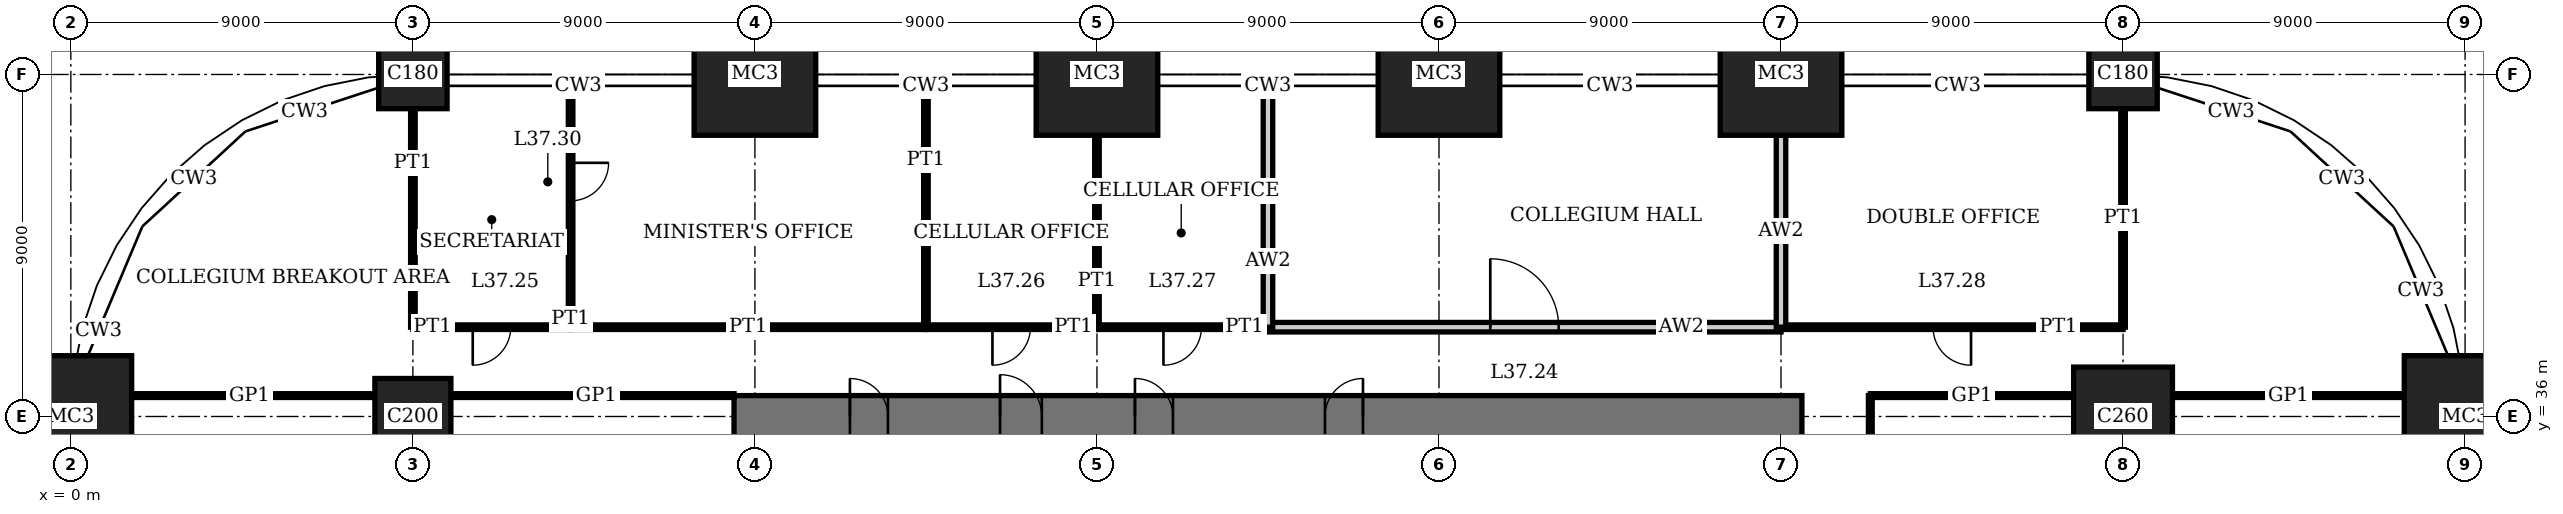
"""IFC4 building model, lengths in metres.
Left out: names, types, materials, properties, quantities, classifications, styles, units other than length and angle.
Written with IfcOpenShell. Run it as: python <this file> out.ifc"""

import sys

from ifc_helpers import new_model, si_unit, direction, frame, frame_2d, origin, origin_2d, place, context, subcontext, project, spatial, rectangle, extrude, element, fill, save


model = new_model("IFC4")
c1 = context("Model", 3, precision=1e-05, world=origin(), true_north=direction((0.0, 1.0)))
c2 = subcontext(c1, "Body", "Model", "MODEL_VIEW")
j1 = project(units=[si_unit("LENGTHUNIT", "METRE"), si_unit("PLANEANGLEUNIT", "RADIAN")], contexts=[c1])
p1 = place(None, origin())
s1 = spatial("IfcSite", under=j1, at=p1, CompositionType="ELEMENT")
p2 = place(p1, origin())
s2 = spatial("IfcBuilding", under=s1, at=p2, CompositionType="ELEMENT")
p3 = place(p2, frame((0.0, 0.0, 153.0)))
s3 = spatial("IfcBuildingStorey", under=s2, at=p3, CompositionType="ELEMENT", Elevation=153.0)
p4 = place(p3, frame((0.0, 36.0, 0.0), z_axis=(0.0, 0.0, 1.0), x_axis=(1.0, 0.0, 0.0)))
e1 = element("IfcColumn", 1, at=p4, inside=s3, PredefinedType="COLUMN", context=c2, shape_type="SweptSolid", body=[
    extrude(rectangle(XDim=3.2, YDim=3.2, at=origin_2d()), origin(), (0.0, 0.0, 1.0), 4.2),
])
p5 = place(p3, frame((9.0, 36.0, 0.0), z_axis=(0.0, 0.0, 1.0), x_axis=(1.0, 0.0, 0.0)))
e2 = element("IfcColumn", 2, at=p5, inside=s3, PredefinedType="COLUMN", context=c2, shape_type="SweptSolid", body=[
    extrude(rectangle(XDim=2.0, YDim=2.0, at=origin_2d()), origin(), (0.0, 0.0, 1.0), 4.2),
])
p6 = place(p3, frame((9.0, 45.0, 0.0), z_axis=(0.0, 0.0, 1.0), x_axis=(1.0, 0.0, 0.0)))
e3 = element("IfcColumn", 3, at=p6, inside=s3, PredefinedType="COLUMN", context=c2, shape_type="SweptSolid", body=[
    extrude(rectangle(XDim=1.8, YDim=1.8, at=origin_2d()), origin(), (0.0, 0.0, 1.0), 4.2),
])
for number, where, z_axis, x_axis in (
    (4, (18.0, 45.0, 0.0), (0.0, 0.0, 1.0), (1.0, 0.0, 0.0)),
    (5, (27.0, 45.0, 0.0), (0.0, 0.0, 1.0), (1.0, 0.0, 0.0)),
    (6, (36.0, 45.0, 0.0), (0.0, 0.0, 1.0), (1.0, 0.0, 0.0)),
    (7, (45.0, 45.0, 0.0), (0.0, 0.0, 1.0), (1.0, 0.0, 0.0)),
):
    element("IfcColumn", number, at=place(p3, frame(where, z_axis=z_axis, x_axis=x_axis)), inside=s3, PredefinedType="COLUMN", context=c2, shape_type="SweptSolid", body=[
        extrude(rectangle(XDim=3.2, YDim=3.2, at=origin_2d()), origin(), (0.0, 0.0, 1.0), 4.2),
    ])
p7 = place(p3, frame((54.0, 36.0, 0.0), z_axis=(0.0, 0.0, 1.0), x_axis=(1.0, 0.0, 0.0)))
e8 = element("IfcColumn", 8, at=p7, inside=s3, PredefinedType="COLUMN", context=c2, shape_type="SweptSolid", body=[
    extrude(rectangle(XDim=2.6, YDim=2.6, at=origin_2d()), origin(), (0.0, 0.0, 1.0), 4.2),
])
p8 = place(p3, frame((54.0, 45.0, 0.0), z_axis=(0.0, 0.0, 1.0), x_axis=(1.0, 0.0, 0.0)))
e9 = element("IfcColumn", 9, at=p8, inside=s3, PredefinedType="COLUMN", context=c2, shape_type="SweptSolid", body=[
    extrude(rectangle(XDim=1.8, YDim=1.8, at=origin_2d()), origin(), (0.0, 0.0, 1.0), 4.2),
])
p9 = place(p3, frame((63.0, 36.0, 0.0), z_axis=(0.0, 0.0, 1.0), x_axis=(1.0, 0.0, 0.0)))
e10 = element("IfcColumn", 10, at=p9, inside=s3, PredefinedType="COLUMN", context=c2, shape_type="SweptSolid", body=[
    extrude(rectangle(XDim=3.2, YDim=3.2, at=origin_2d()), origin(), (0.0, 0.0, 1.0), 4.2),
])
p10 = place(p3, frame((45.55, 36.0, 0.0), z_axis=(0.0, 0.0, 1.0), x_axis=(-1.0, 0.0, 0.0)))
e11 = element("IfcWall", 11, at=p10, inside=s3, PredefinedType="SHEAR", context=c2, shape_type="SweptSolid", body=[
    extrude(rectangle(XDim=28.1, YDim=1.1, at=frame_2d((14.05, 0.0))), origin(), (0.0, 0.0, 1.0), 4.2),
])
p11 = place(p10, frame((11.55, 0.0, 0.0)))
e12 = element("IfcOpeningElement", 12, at=p11, cuts=e11, PredefinedType="OPENING", context=c2, shape_type="SweptSolid", body=[
    extrude(rectangle(XDim=1.0, YDim=2.4, at=frame_2d((0.5, 1.2))), frame((0.0, 0.56, 0.0), z_axis=(0.0, -1.0, 0.0), x_axis=(1.0, 0.0, 0.0)), (0.0, 0.0, 1.0), 1.12),
])
p12 = place(p10, frame((16.55, 0.0, 0.0)))
e13 = element("IfcOpeningElement", 13, at=p12, cuts=e11, PredefinedType="OPENING", context=c2, shape_type="SweptSolid", body=[
    extrude(rectangle(XDim=1.0, YDim=2.4, at=frame_2d((0.5, 1.2))), frame((0.0, 0.56, 0.0), z_axis=(0.0, -1.0, 0.0), x_axis=(1.0, 0.0, 0.0)), (0.0, 0.0, 1.0), 1.12),
])
p13 = place(p10, frame((20.0, 0.0, 0.0)))
e14 = element("IfcOpeningElement", 14, at=p13, cuts=e11, PredefinedType="OPENING", context=c2, shape_type="SweptSolid", body=[
    extrude(rectangle(XDim=1.1, YDim=2.4, at=frame_2d((0.55, 1.2))), frame((0.0, 0.56, 0.0), z_axis=(0.0, -1.0, 0.0), x_axis=(1.0, 0.0, 0.0)), (0.0, 0.0, 1.0), 1.12),
])
p14 = place(p10, frame((24.05, 0.0, 0.0)))
e15 = element("IfcOpeningElement", 15, at=p14, cuts=e11, PredefinedType="OPENING", context=c2, shape_type="SweptSolid", body=[
    extrude(rectangle(XDim=1.0, YDim=2.4, at=frame_2d((0.5, 1.2))), frame((0.0, 0.56, 0.0), z_axis=(0.0, -1.0, 0.0), x_axis=(1.0, 0.0, 0.0)), (0.0, 0.0, 1.0), 1.12),
])
p15 = place(p3, frame((1.6, 36.55, 0.0), z_axis=(0.0, 0.0, 1.0), x_axis=(1.0, 0.0, 0.0)))
e16 = element("IfcWall", 16, at=p15, inside=s3, PredefinedType="PARTITIONING", context=c2, shape_type="SweptSolid", body=[
    extrude(rectangle(XDim=6.4, YDim=0.1, at=frame_2d((3.2, 0.0))), origin(), (0.0, 0.0, 1.0), 3.85),
])
p16 = place(p3, frame((10.0, 36.55, 0.0), z_axis=(0.0, 0.0, 1.0), x_axis=(1.0, 0.0, 0.0)))
e17 = element("IfcWall", 17, at=p16, inside=s3, PredefinedType="PARTITIONING", context=c2, shape_type="SweptSolid", body=[
    extrude(rectangle(XDim=7.45, YDim=0.1, at=frame_2d((3.725, 0.0))), origin(), (0.0, 0.0, 1.0), 3.85),
])
p17 = place(p3, frame((47.35, 36.55, 0.0), z_axis=(0.0, 0.0, 1.0), x_axis=(1.0, 0.0, 0.0)))
e18 = element("IfcWall", 18, at=p17, inside=s3, PredefinedType="PARTITIONING", context=c2, shape_type="SweptSolid", body=[
    extrude(rectangle(XDim=5.35, YDim=0.1, at=frame_2d((2.675, 0.0))), origin(), (0.0, 0.0, 1.0), 3.85),
])
p18 = place(p3, frame((55.3, 36.55, 0.0), z_axis=(0.0, 0.0, 1.0), x_axis=(1.0, 0.0, 0.0)))
e19 = element("IfcWall", 19, at=p18, inside=s3, PredefinedType="PARTITIONING", context=c2, shape_type="SweptSolid", body=[
    extrude(rectangle(XDim=6.1, YDim=0.1, at=frame_2d((3.05, 0.0))), origin(), (0.0, 0.0, 1.0), 3.85),
])
p19 = place(p3, frame((31.5, 38.35, 0.0), z_axis=(0.0, 0.0, 1.0), x_axis=(1.0, 0.0, 0.0)))
e20 = element("IfcWall", 20, at=p19, inside=s3, PredefinedType="PARTITIONING", context=c2, shape_type="SweptSolid", body=[
    extrude(rectangle(XDim=13.5, YDim=0.25, at=frame_2d((6.75, 0.0))), origin(), (0.0, 0.0, 1.0), 3.85),
])
p20 = place(p19, frame((5.85, 0.0, 0.0)))
e21 = element("IfcOpeningElement", 21, at=p20, cuts=e20, PredefinedType="OPENING", context=c2, shape_type="SweptSolid", body=[
    extrude(rectangle(XDim=1.8, YDim=2.4, at=frame_2d((0.9, 1.2))), frame((0.0, 0.135, 0.0), z_axis=(0.0, -1.0, 0.0), x_axis=(1.0, 0.0, 0.0)), (0.0, 0.0, 1.0), 0.27),
])
p21 = place(p3, frame((9.0, 38.35, 0.0), z_axis=(0.0, 0.0, 1.0), x_axis=(1.0, 0.0, 0.0)))
e22 = element("IfcWall", 22, at=p21, inside=s3, PredefinedType="PARTITIONING", context=c2, shape_type="SweptSolid", body=[
    extrude(rectangle(XDim=4.15, YDim=0.12, at=frame_2d((2.075, 0.0))), origin(), (0.0, 0.0, 1.0), 3.85),
])
p22 = place(p21, frame((1.575, 0.0, 0.0)))
e23 = element("IfcOpeningElement", 23, at=p22, cuts=e22, PredefinedType="OPENING", context=c2, shape_type="SweptSolid", body=[
    extrude(rectangle(XDim=1.0, YDim=2.4, at=frame_2d((0.5, 1.2))), frame((0.0, 0.07, 0.0), z_axis=(0.0, -1.0, 0.0), x_axis=(1.0, 0.0, 0.0)), (0.0, 0.0, 1.0), 0.14),
])
p23 = place(p3, frame((13.15, 38.35, 0.0), z_axis=(0.0, 0.0, 1.0), x_axis=(1.0, 0.0, 0.0)))
e24 = element("IfcWall", 24, at=p23, inside=s3, PredefinedType="PARTITIONING", context=c2, shape_type="SweptSolid", body=[
    extrude(rectangle(XDim=9.35, YDim=0.12, at=frame_2d((4.675, 0.0))), origin(), (0.0, 0.0, 1.0), 3.85),
])
p24 = place(p3, frame((22.5, 38.35, 0.0), z_axis=(0.0, 0.0, 1.0), x_axis=(1.0, 0.0, 0.0)))
e25 = element("IfcWall", 25, at=p24, inside=s3, PredefinedType="PARTITIONING", context=c2, shape_type="SweptSolid", body=[
    extrude(rectangle(XDim=4.5, YDim=0.12, at=frame_2d((2.25, 0.0))), origin(), (0.0, 0.0, 1.0), 3.85),
])
p25 = place(p24, frame((1.75, 0.0, 0.0)))
e26 = element("IfcOpeningElement", 26, at=p25, cuts=e25, PredefinedType="OPENING", context=c2, shape_type="SweptSolid", body=[
    extrude(rectangle(XDim=1.0, YDim=2.4, at=frame_2d((0.5, 1.2))), frame((0.0, 0.07, 0.0), z_axis=(0.0, -1.0, 0.0), x_axis=(1.0, 0.0, 0.0)), (0.0, 0.0, 1.0), 0.14),
])
p26 = place(p3, frame((27.0, 38.35, 0.0), z_axis=(0.0, 0.0, 1.0), x_axis=(1.0, 0.0, 0.0)))
e27 = element("IfcWall", 27, at=p26, inside=s3, PredefinedType="PARTITIONING", context=c2, shape_type="SweptSolid", body=[
    extrude(rectangle(XDim=4.5, YDim=0.12, at=frame_2d((2.25, 0.0))), origin(), (0.0, 0.0, 1.0), 3.85),
])
p27 = place(p26, frame((1.75, 0.0, 0.0)))
e28 = element("IfcOpeningElement", 28, at=p27, cuts=e27, PredefinedType="OPENING", context=c2, shape_type="SweptSolid", body=[
    extrude(rectangle(XDim=1.0, YDim=2.4, at=frame_2d((0.5, 1.2))), frame((0.0, 0.07, 0.0), z_axis=(0.0, -1.0, 0.0), x_axis=(1.0, 0.0, 0.0)), (0.0, 0.0, 1.0), 0.14),
])
p28 = place(p3, frame((45.0, 38.35, 0.0), z_axis=(0.0, 0.0, 1.0), x_axis=(1.0, 0.0, 0.0)))
e29 = element("IfcWall", 29, at=p28, inside=s3, PredefinedType="PARTITIONING", context=c2, shape_type="SweptSolid", body=[
    extrude(rectangle(XDim=9.0, YDim=0.12, at=frame_2d((4.5, 0.0))), origin(), (0.0, 0.0, 1.0), 3.85),
])
p29 = place(p28, frame((4.0, 0.0, 0.0)))
e30 = element("IfcOpeningElement", 30, at=p29, cuts=e29, PredefinedType="OPENING", context=c2, shape_type="SweptSolid", body=[
    extrude(rectangle(XDim=1.0, YDim=2.4, at=frame_2d((0.5, 1.2))), frame((0.0, 0.07, 0.0), z_axis=(0.0, -1.0, 0.0), x_axis=(1.0, 0.0, 0.0)), (0.0, 0.0, 1.0), 0.14),
])
p30 = place(p3, frame((9.0, 38.35, 0.0), z_axis=(0.0, 0.0, 1.0), x_axis=(0.0, 1.0, 0.0)))
e31 = element("IfcWall", 31, at=p30, inside=s3, PredefinedType="PARTITIONING", context=c2, shape_type="SweptSolid", body=[
    extrude(rectangle(XDim=5.75, YDim=0.12, at=frame_2d((2.875, 0.0))), origin(), (0.0, 0.0, 1.0), 3.05),
])
p31 = place(p3, frame((13.15, 38.35, 0.0), z_axis=(0.0, 0.0, 1.0), x_axis=(0.0, 1.0, 0.0)))
e32 = element("IfcWall", 32, at=p31, inside=s3, PredefinedType="PARTITIONING", context=c2, shape_type="SweptSolid", body=[
    extrude(rectangle(XDim=6.34, YDim=0.12, at=frame_2d((3.17, 0.0))), origin(), (0.0, 0.0, 1.0), 3.85),
])
p32 = place(p31, frame((3.325, 0.0, 0.0)))
e33 = element("IfcOpeningElement", 33, at=p32, cuts=e32, PredefinedType="OPENING", context=c2, shape_type="SweptSolid", body=[
    extrude(rectangle(XDim=1.0, YDim=2.4, at=frame_2d((0.5, 1.2))), frame((0.0, 0.07, 0.0), z_axis=(0.0, -1.0, 0.0), x_axis=(1.0, 0.0, 0.0)), (0.0, 0.0, 1.0), 0.14),
])
p33 = place(p3, frame((22.5, 38.35, 0.0), z_axis=(0.0, 0.0, 1.0), x_axis=(0.0, 1.0, 0.0)))
e34 = element("IfcWall", 34, at=p33, inside=s3, PredefinedType="PARTITIONING", context=c2, shape_type="SweptSolid", body=[
    extrude(rectangle(XDim=6.34, YDim=0.12, at=frame_2d((3.17, 0.0))), origin(), (0.0, 0.0, 1.0), 3.85),
])
p34 = place(p3, frame((27.0, 38.35, 0.0), z_axis=(0.0, 0.0, 1.0), x_axis=(0.0, 1.0, 0.0)))
e35 = element("IfcWall", 35, at=p34, inside=s3, PredefinedType="PARTITIONING", context=c2, shape_type="SweptSolid", body=[
    extrude(rectangle(XDim=5.05, YDim=0.12, at=frame_2d((2.525, 0.0))), origin(), (0.0, 0.0, 1.0), 3.25),
])
p35 = place(p3, frame((31.5, 38.35, 0.0), z_axis=(0.0, 0.0, 1.0), x_axis=(0.0, 1.0, 0.0)))
e36 = element("IfcWall", 36, at=p35, inside=s3, PredefinedType="PARTITIONING", context=c2, shape_type="SweptSolid", body=[
    extrude(rectangle(XDim=6.34, YDim=0.25, at=frame_2d((3.17, 0.0))), origin(), (0.0, 0.0, 1.0), 3.85),
])
p36 = place(p3, frame((45.0, 38.35, 0.0), z_axis=(0.0, 0.0, 1.0), x_axis=(0.0, 1.0, 0.0)))
e37 = element("IfcWall", 37, at=p36, inside=s3, PredefinedType="PARTITIONING", context=c2, shape_type="SweptSolid", body=[
    extrude(rectangle(XDim=5.05, YDim=0.25, at=frame_2d((2.525, 0.0))), origin(), (0.0, 0.0, 1.0), 3.25),
])
p37 = place(p3, frame((47.35, 31.5, 0.0), z_axis=(0.0, 0.0, 1.0), x_axis=(0.0, 1.0, 0.0)))
e38 = element("IfcWall", 38, at=p37, inside=s3, PredefinedType="PARTITIONING", context=c2, shape_type="SweptSolid", body=[
    extrude(rectangle(XDim=5.05, YDim=0.1, at=frame_2d((2.525, 0.0))), origin(), (0.0, 0.0, 1.0), 3.85),
])
p38 = place(p3, frame((54.0, 38.35, 0.0), z_axis=(0.0, 0.0, 1.0), x_axis=(0.0, 1.0, 0.0)))
e39 = element("IfcWall", 39, at=p38, inside=s3, PredefinedType="PARTITIONING", context=c2, shape_type="SweptSolid", body=[
    extrude(rectangle(XDim=5.75, YDim=0.12, at=frame_2d((2.875, 0.0))), origin(), (0.0, 0.0, 1.0), 3.05),
])
p39 = place(p11, origin())
e40 = element("IfcDoor", 40, at=p39, inside=s3, OperationType="SINGLE_SWING_LEFT", PredefinedType="DOOR", context=c2, shape_type="SweptSolid", body=[
    extrude(rectangle(XDim=1.0, YDim=2.4, at=frame_2d((0.5, 1.2))), frame((0.0, 0.025, 0.0), z_axis=(0.0, -1.0, 0.0), x_axis=(1.0, 0.0, 0.0)), (0.0, 0.0, 1.0), 0.05),
    extrude(rectangle(XDim=0.04, YDim=2.4, at=frame_2d((0.02, 1.2))), frame((0.0, 0.4, 0.0), z_axis=(0.0, -1.0, 0.0), x_axis=(1.0, 0.0, 0.0)), (0.0, 0.0, 1.0), 0.8),
    extrude(rectangle(XDim=0.04, YDim=2.4, at=frame_2d((0.98, 1.2))), frame((0.0, 0.4, 0.0), z_axis=(0.0, -1.0, 0.0), x_axis=(1.0, 0.0, 0.0)), (0.0, 0.0, 1.0), 0.8),
    extrude(rectangle(XDim=1.0, YDim=0.04, at=frame_2d((0.5, 2.38))), frame((0.0, 0.4, 0.0), z_axis=(0.0, -1.0, 0.0), x_axis=(1.0, 0.0, 0.0)), (0.0, 0.0, 1.0), 0.8),
])
fill(e12, e40)
p40 = place(p12, origin())
e41 = element("IfcDoor", 41, at=p40, inside=s3, OperationType="SINGLE_SWING_RIGHT", PredefinedType="DOOR", context=c2, shape_type="SweptSolid", body=[
    extrude(rectangle(XDim=1.0, YDim=2.4, at=frame_2d((0.5, 1.2))), frame((0.0, 0.025, 0.0), z_axis=(0.0, -1.0, 0.0), x_axis=(1.0, 0.0, 0.0)), (0.0, 0.0, 1.0), 0.05),
    extrude(rectangle(XDim=0.04, YDim=2.4, at=frame_2d((0.02, 1.2))), frame((0.0, 0.4, 0.0), z_axis=(0.0, -1.0, 0.0), x_axis=(1.0, 0.0, 0.0)), (0.0, 0.0, 1.0), 0.8),
    extrude(rectangle(XDim=0.04, YDim=2.4, at=frame_2d((0.98, 1.2))), frame((0.0, 0.4, 0.0), z_axis=(0.0, -1.0, 0.0), x_axis=(1.0, 0.0, 0.0)), (0.0, 0.0, 1.0), 0.8),
    extrude(rectangle(XDim=1.0, YDim=0.04, at=frame_2d((0.5, 2.38))), frame((0.0, 0.4, 0.0), z_axis=(0.0, -1.0, 0.0), x_axis=(1.0, 0.0, 0.0)), (0.0, 0.0, 1.0), 0.8),
])
fill(e13, e41)
p41 = place(p13, origin())
e42 = element("IfcDoor", 42, at=p41, inside=s3, OperationType="SINGLE_SWING_RIGHT", PredefinedType="DOOR", context=c2, shape_type="SweptSolid", body=[
    extrude(rectangle(XDim=1.1, YDim=2.4, at=frame_2d((0.55, 1.2))), frame((0.0, 0.025, 0.0), z_axis=(0.0, -1.0, 0.0), x_axis=(1.0, 0.0, 0.0)), (0.0, 0.0, 1.0), 0.05),
    extrude(rectangle(XDim=0.04, YDim=2.4, at=frame_2d((0.02, 1.2))), frame((0.0, 0.44, 0.0), z_axis=(0.0, -1.0, 0.0), x_axis=(1.0, 0.0, 0.0)), (0.0, 0.0, 1.0), 0.88),
    extrude(rectangle(XDim=0.04, YDim=2.4, at=frame_2d((1.08, 1.2))), frame((0.0, 0.44, 0.0), z_axis=(0.0, -1.0, 0.0), x_axis=(1.0, 0.0, 0.0)), (0.0, 0.0, 1.0), 0.88),
    extrude(rectangle(XDim=1.1, YDim=0.04, at=frame_2d((0.55, 2.38))), frame((0.0, 0.44, 0.0), z_axis=(0.0, -1.0, 0.0), x_axis=(1.0, 0.0, 0.0)), (0.0, 0.0, 1.0), 0.88),
])
fill(e14, e42)
p42 = place(p14, origin())
e43 = element("IfcDoor", 43, at=p42, inside=s3, OperationType="SINGLE_SWING_RIGHT", PredefinedType="DOOR", context=c2, shape_type="SweptSolid", body=[
    extrude(rectangle(XDim=1.0, YDim=2.4, at=frame_2d((0.5, 1.2))), frame((0.0, 0.025, 0.0), z_axis=(0.0, -1.0, 0.0), x_axis=(1.0, 0.0, 0.0)), (0.0, 0.0, 1.0), 0.05),
    extrude(rectangle(XDim=0.04, YDim=2.4, at=frame_2d((0.02, 1.2))), frame((0.0, 0.4, 0.0), z_axis=(0.0, -1.0, 0.0), x_axis=(1.0, 0.0, 0.0)), (0.0, 0.0, 1.0), 0.8),
    extrude(rectangle(XDim=0.04, YDim=2.4, at=frame_2d((0.98, 1.2))), frame((0.0, 0.4, 0.0), z_axis=(0.0, -1.0, 0.0), x_axis=(1.0, 0.0, 0.0)), (0.0, 0.0, 1.0), 0.8),
    extrude(rectangle(XDim=1.0, YDim=0.04, at=frame_2d((0.5, 2.38))), frame((0.0, 0.4, 0.0), z_axis=(0.0, -1.0, 0.0), x_axis=(1.0, 0.0, 0.0)), (0.0, 0.0, 1.0), 0.8),
])
fill(e15, e43)
p43 = place(p20, origin())
e44 = element("IfcDoor", 44, at=p43, inside=s3, OperationType="DOUBLE_DOOR_SINGLE_SWING", PredefinedType="DOOR", context=c2, shape_type="SweptSolid", body=[
    extrude(rectangle(XDim=1.8, YDim=2.4, at=frame_2d((0.9, 1.2))), frame((0.0, 0.025, 0.0), z_axis=(0.0, -1.0, 0.0), x_axis=(1.0, 0.0, 0.0)), (0.0, 0.0, 1.0), 0.05),
])
fill(e21, e44)
p44 = place(p22, origin())
e45 = element("IfcDoor", 45, at=p44, inside=s3, OperationType="SINGLE_SWING_LEFT", PredefinedType="DOOR", context=c2, shape_type="SweptSolid", body=[
    extrude(rectangle(XDim=1.0, YDim=2.4, at=frame_2d((0.5, 1.2))), frame((0.0, 0.025, 0.0), z_axis=(0.0, -1.0, 0.0), x_axis=(1.0, 0.0, 0.0)), (0.0, 0.0, 1.0), 0.05),
])
fill(e23, e45)
p45 = place(p25, origin())
e46 = element("IfcDoor", 46, at=p45, inside=s3, OperationType="SINGLE_SWING_LEFT", PredefinedType="DOOR", context=c2, shape_type="SweptSolid", body=[
    extrude(rectangle(XDim=1.0, YDim=2.4, at=frame_2d((0.5, 1.2))), frame((0.0, 0.025, 0.0), z_axis=(0.0, -1.0, 0.0), x_axis=(1.0, 0.0, 0.0)), (0.0, 0.0, 1.0), 0.05),
])
fill(e26, e46)
p46 = place(p27, origin())
e47 = element("IfcDoor", 47, at=p46, inside=s3, OperationType="SINGLE_SWING_LEFT", PredefinedType="DOOR", context=c2, shape_type="SweptSolid", body=[
    extrude(rectangle(XDim=1.0, YDim=2.4, at=frame_2d((0.5, 1.2))), frame((0.0, 0.025, 0.0), z_axis=(0.0, -1.0, 0.0), x_axis=(1.0, 0.0, 0.0)), (0.0, 0.0, 1.0), 0.05),
])
fill(e28, e47)
p47 = place(p29, origin())
e48 = element("IfcDoor", 48, at=p47, inside=s3, OperationType="SINGLE_SWING_RIGHT", PredefinedType="DOOR", context=c2, shape_type="SweptSolid", body=[
    extrude(rectangle(XDim=1.0, YDim=2.4, at=frame_2d((0.5, 1.2))), frame((0.0, 0.025, 0.0), z_axis=(0.0, -1.0, 0.0), x_axis=(1.0, 0.0, 0.0)), (0.0, 0.0, 1.0), 0.05),
])
fill(e30, e48)
p48 = place(p32, origin())
e49 = element("IfcDoor", 49, at=p48, inside=s3, OperationType="SINGLE_SWING_RIGHT", PredefinedType="DOOR", context=c2, shape_type="SweptSolid", body=[
    extrude(rectangle(XDim=1.0, YDim=2.4, at=frame_2d((0.5, 1.2))), frame((0.0, 0.025, 0.0), z_axis=(0.0, -1.0, 0.0), x_axis=(1.0, 0.0, 0.0)), (0.0, 0.0, 1.0), 0.05),
])
fill(e33, e49)
save(model, sys.argv[1])
